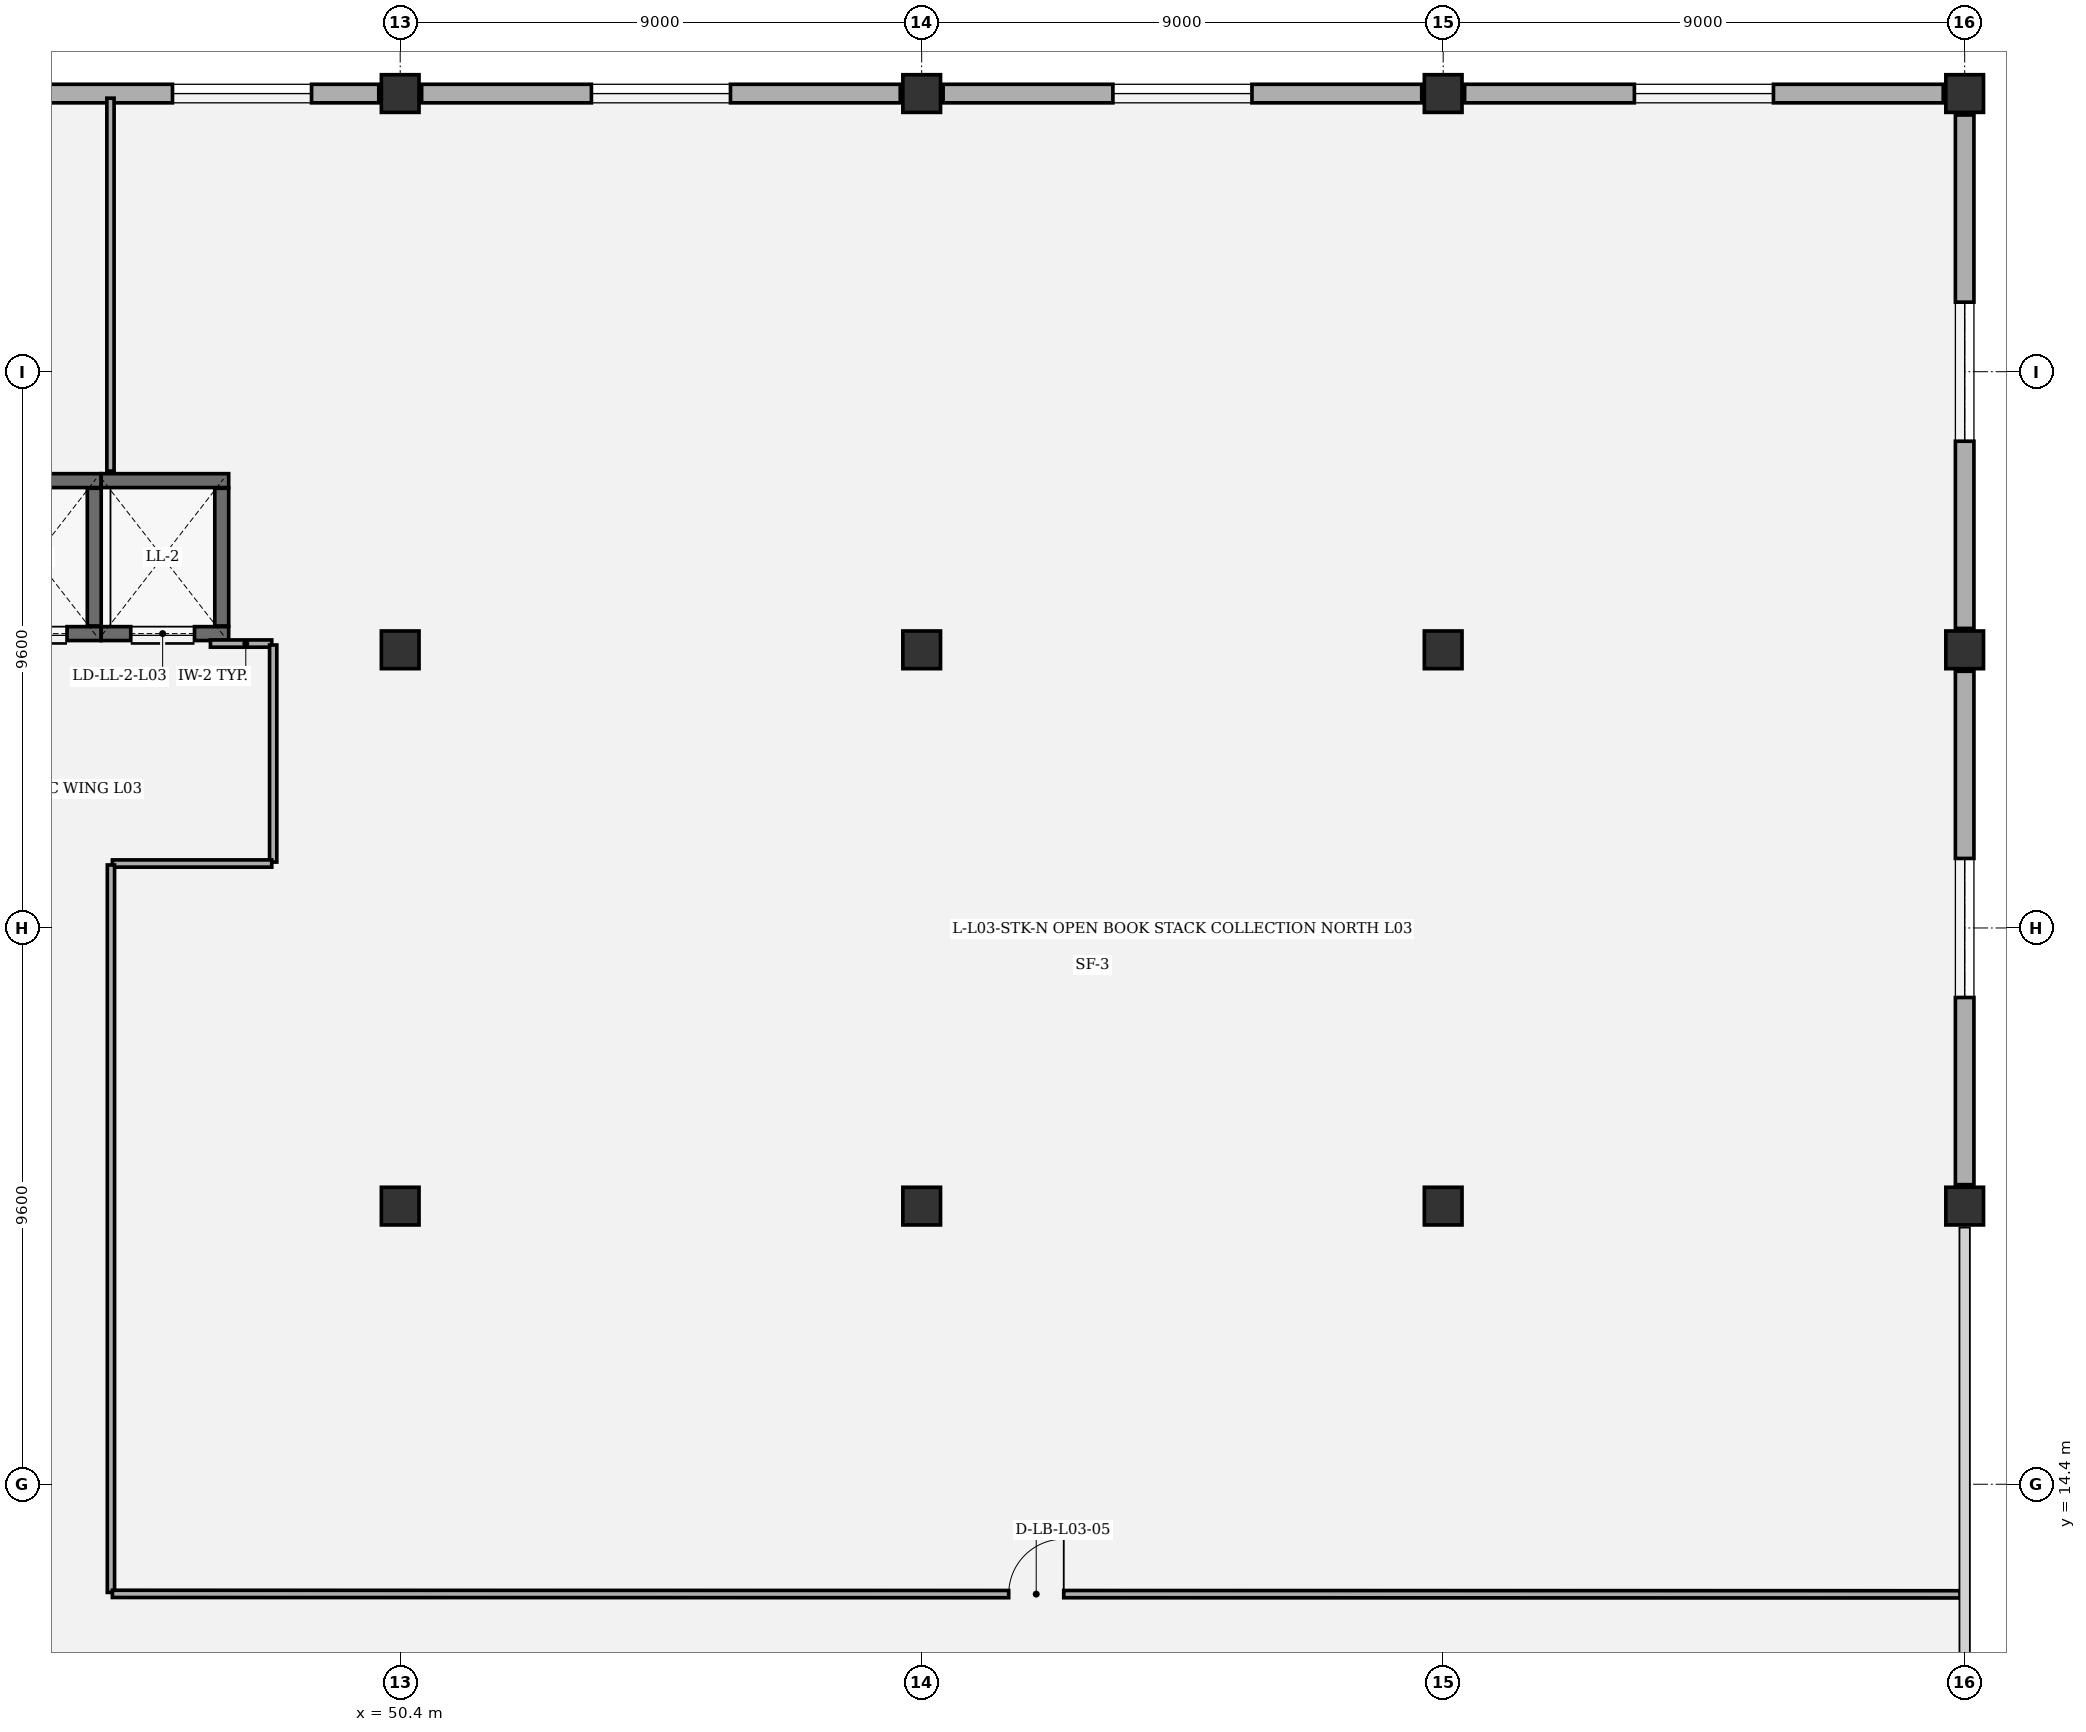
"""IFC4 building model, lengths in metres.
Left out: names, types, materials, properties, quantities, classifications, styles, units other than length and angle.
Written with IfcOpenShell. Run it as: python <this file> out.ifc"""

import sys

from ifc_helpers import new_model, si_unit, direction, frame, frame_2d, origin, origin_2d, place, context, subcontext, project, spatial, rectangle, extrude, element, fill, save


model = new_model("IFC4")
c1 = context("Model", 3, precision=1e-05, world=origin(), true_north=direction((0.0, 1.0)))
c2 = subcontext(c1, "Body", "Model", "MODEL_VIEW")
j1 = project(units=[si_unit("LENGTHUNIT", "METRE"), si_unit("PLANEANGLEUNIT", "RADIAN")], contexts=[c1])
p1 = place(None, origin())
s1 = spatial("IfcSite", under=j1, at=p1, CompositionType="ELEMENT")
p2 = place(p1, origin())
s2 = spatial("IfcBuilding", under=s1, at=p2, CompositionType="ELEMENT")
p3 = place(p2, frame((0.0, 0.0, 17.0)))
s3 = spatial("IfcBuildingStorey", under=s2, at=p3, CompositionType="ELEMENT", Elevation=17.0)
for number, where, z_axis, x_axis in (
    (1, (50.4, 19.2, 0.0), (0.0, 0.0, 1.0), (1.0, 0.0, 0.0)),
    (2, (50.4, 28.8, 0.0), (0.0, 0.0, 1.0), (1.0, 0.0, 0.0)),
    (3, (50.4, 38.4, 0.0), (0.0, 0.0, 1.0), (1.0, 0.0, 0.0)),
    (4, (59.4, 19.2, 0.0), (0.0, 0.0, 1.0), (1.0, 0.0, 0.0)),
    (5, (59.4, 28.8, 0.0), (0.0, 0.0, 1.0), (1.0, 0.0, 0.0)),
    (6, (59.4, 38.4, 0.0), (0.0, 0.0, 1.0), (1.0, 0.0, 0.0)),
    (7, (68.4, 19.2, 0.0), (0.0, 0.0, 1.0), (1.0, 0.0, 0.0)),
    (8, (68.4, 28.8, 0.0), (0.0, 0.0, 1.0), (1.0, 0.0, 0.0)),
    (9, (68.4, 38.4, 0.0), (0.0, 0.0, 1.0), (1.0, 0.0, 0.0)),
    (10, (77.4, 19.2, 0.0), (0.0, 0.0, 1.0), (1.0, 0.0, 0.0)),
    (11, (77.4, 28.8, 0.0), (0.0, 0.0, 1.0), (1.0, 0.0, 0.0)),
    (12, (77.4, 38.4, 0.0), (0.0, 0.0, 1.0), (1.0, 0.0, 0.0)),
):
    element("IfcColumn", number, at=place(p3, frame(where, z_axis=z_axis, x_axis=x_axis)), inside=s3, PredefinedType="COLUMN", context=c2, shape_type="SweptSolid", body=[
        extrude(rectangle(XDim=0.65, YDim=0.65, at=origin_2d()), origin(), (0.0, 0.0, 1.0), 5.0),
    ])
p4 = place(p3, frame((77.4, 28.43, 0.0), z_axis=(0.0, 0.0, 1.0), x_axis=(0.0, -1.0, 0.0)))
e13 = element("IfcWall", 13, at=p4, inside=s3, PredefinedType="SOLIDWALL", context=c2, shape_type="SweptSolid", body=[
    extrude(rectangle(XDim=8.86, YDim=0.32, at=frame_2d((4.43, 0.0))), origin(), (0.0, 0.0, 1.0), 3.937),
])
p5 = place(p4, frame((3.23, 0.0, 0.8)))
e14 = element("IfcOpeningElement", 14, at=p5, cuts=e13, PredefinedType="OPENING", context=c2, shape_type="SweptSolid", body=[
    extrude(rectangle(XDim=2.4, YDim=1.65, at=frame_2d((1.2, 0.825))), frame((0.0, 0.17, 0.0), z_axis=(0.0, -1.0, 0.0), x_axis=(1.0, 0.0, 0.0)), (0.0, 0.0, 1.0), 0.34),
])
p6 = place(p3, frame((77.4, 38.03, 0.0), z_axis=(0.0, 0.0, 1.0), x_axis=(0.0, -1.0, 0.0)))
e15 = element("IfcWall", 15, at=p6, inside=s3, PredefinedType="SOLIDWALL", context=c2, shape_type="SweptSolid", body=[
    extrude(rectangle(XDim=8.86, YDim=0.32, at=frame_2d((4.43, 0.0))), origin(), (0.0, 0.0, 1.0), 3.937),
])
p7 = place(p6, frame((3.23, 0.0, 0.8)))
e16 = element("IfcOpeningElement", 16, at=p7, cuts=e15, PredefinedType="OPENING", context=c2, shape_type="SweptSolid", body=[
    extrude(rectangle(XDim=2.4, YDim=1.65, at=frame_2d((1.2, 0.825))), frame((0.0, 0.17, 0.0), z_axis=(0.0, -1.0, 0.0), x_axis=(1.0, 0.0, 0.0)), (0.0, 0.0, 1.0), 0.34),
])
p8 = place(p3, frame((68.77, 38.4, 0.0), z_axis=(0.0, 0.0, 1.0), x_axis=(1.0, 0.0, 0.0)))
e17 = element("IfcWall", 17, at=p8, inside=s3, PredefinedType="SOLIDWALL", context=c2, shape_type="SweptSolid", body=[
    extrude(rectangle(XDim=8.26, YDim=0.32, at=frame_2d((4.13, 0.0))), origin(), (0.0, 0.0, 1.0), 3.937),
])
p9 = place(p8, frame((2.93, 0.0, 0.8)))
e18 = element("IfcOpeningElement", 18, at=p9, cuts=e17, PredefinedType="OPENING", context=c2, shape_type="SweptSolid", body=[
    extrude(rectangle(XDim=2.4, YDim=1.65, at=frame_2d((1.2, 0.825))), frame((0.0, 0.17, 0.0), z_axis=(0.0, -1.0, 0.0), x_axis=(1.0, 0.0, 0.0)), (0.0, 0.0, 1.0), 0.34),
])
p10 = place(p3, frame((59.77, 38.4, 0.0), z_axis=(0.0, 0.0, 1.0), x_axis=(1.0, 0.0, 0.0)))
e19 = element("IfcWall", 19, at=p10, inside=s3, PredefinedType="SOLIDWALL", context=c2, shape_type="SweptSolid", body=[
    extrude(rectangle(XDim=8.26, YDim=0.32, at=frame_2d((4.13, 0.0))), origin(), (0.0, 0.0, 1.0), 3.937),
])
p11 = place(p10, frame((2.93, 0.0, 0.8)))
e20 = element("IfcOpeningElement", 20, at=p11, cuts=e19, PredefinedType="OPENING", context=c2, shape_type="SweptSolid", body=[
    extrude(rectangle(XDim=2.4, YDim=1.65, at=frame_2d((1.2, 0.825))), frame((0.0, 0.17, 0.0), z_axis=(0.0, -1.0, 0.0), x_axis=(1.0, 0.0, 0.0)), (0.0, 0.0, 1.0), 0.34),
])
p12 = place(p3, frame((50.77, 38.4, 0.0), z_axis=(0.0, 0.0, 1.0), x_axis=(1.0, 0.0, 0.0)))
e21 = element("IfcWall", 21, at=p12, inside=s3, PredefinedType="SOLIDWALL", context=c2, shape_type="SweptSolid", body=[
    extrude(rectangle(XDim=8.26, YDim=0.32, at=frame_2d((4.13, 0.0))), origin(), (0.0, 0.0, 1.0), 3.937),
])
p13 = place(p12, frame((2.93, 0.0, 0.8)))
e22 = element("IfcOpeningElement", 22, at=p13, cuts=e21, PredefinedType="OPENING", context=c2, shape_type="SweptSolid", body=[
    extrude(rectangle(XDim=2.4, YDim=1.65, at=frame_2d((1.2, 0.825))), frame((0.0, 0.17, 0.0), z_axis=(0.0, -1.0, 0.0), x_axis=(1.0, 0.0, 0.0)), (0.0, 0.0, 1.0), 0.34),
])
p14 = place(p3, frame((41.77, 38.4, 0.0), z_axis=(0.0, 0.0, 1.0), x_axis=(1.0, 0.0, 0.0)))
e23 = element("IfcWall", 23, at=p14, inside=s3, PredefinedType="SOLIDWALL", context=c2, shape_type="SweptSolid", body=[
    extrude(rectangle(XDim=8.26, YDim=0.32, at=frame_2d((4.13, 0.0))), origin(), (0.0, 0.0, 1.0), 3.937),
])
p15 = place(p14, frame((4.7, 0.0, 0.8)))
e24 = element("IfcOpeningElement", 24, at=p15, cuts=e23, PredefinedType="OPENING", context=c2, shape_type="SweptSolid", body=[
    extrude(rectangle(XDim=2.4, YDim=1.65, at=frame_2d((1.2, 0.825))), frame((0.0, 0.17, 0.0), z_axis=(0.0, -1.0, 0.0), x_axis=(1.0, 0.0, 0.0)), (0.0, 0.0, 1.0), 0.34),
])
p16 = place(p3, frame((45.24, 29.08, 0.0), z_axis=(0.0, 0.0, 1.0), x_axis=(-1.0, 0.0, 0.0)))
e25 = element("IfcWall", 25, at=p16, inside=s3, PredefinedType="SHEAR", context=c2, shape_type="SweptSolid", body=[
    extrude(rectangle(XDim=2.28, YDim=0.24, at=frame_2d((1.14, 0.0))), origin(), (0.0, 0.0, 1.0), 4.74),
])
p17 = place(p16, frame((0.59, 0.0, 0.0)))
e26 = element("IfcOpeningElement", 26, at=p17, cuts=e25, PredefinedType="OPENING", context=c2, shape_type="SweptSolid", body=[
    extrude(rectangle(XDim=1.1, YDim=2.2, at=frame_2d((0.55, 1.1))), frame((0.0, 0.13, 0.0), z_axis=(0.0, -1.0, 0.0), x_axis=(1.0, 0.0, 0.0)), (0.0, 0.0, 1.0), 0.26),
])
p18 = place(p3, frame((42.96, 31.72, 0.0), z_axis=(0.0, 0.0, 1.0), x_axis=(1.0, 0.0, 0.0)))
e27 = element("IfcWall", 27, at=p18, inside=s3, PredefinedType="SHEAR", context=c2, shape_type="SweptSolid", body=[
    extrude(rectangle(XDim=2.28, YDim=0.24, at=frame_2d((1.14, 0.0))), origin(), (0.0, 0.0, 1.0), 4.74),
])
p19 = place(p3, frame((45.12, 31.588, 0.0), z_axis=(0.0, 0.0, 1.0), x_axis=(0.0, -1.0, 0.0)))
e28 = element("IfcWall", 28, at=p19, inside=s3, PredefinedType="SHEAR", context=c2, shape_type="SweptSolid", body=[
    extrude(rectangle(XDim=2.376, YDim=0.24, at=frame_2d((1.188, 0.0))), origin(), (0.0, 0.0, 1.0), 4.74),
])
p20 = place(p3, frame((47.44, 29.08, 0.0), z_axis=(0.0, 0.0, 1.0), x_axis=(-1.0, 0.0, 0.0)))
e29 = element("IfcWall", 29, at=p20, inside=s3, PredefinedType="SHEAR", context=c2, shape_type="SweptSolid", body=[
    extrude(rectangle(XDim=2.2, YDim=0.24, at=frame_2d((1.1, 0.0))), origin(), (0.0, 0.0, 1.0), 4.74),
])
p21 = place(p20, frame((0.59, 0.0, 0.0)))
e30 = element("IfcOpeningElement", 30, at=p21, cuts=e29, PredefinedType="OPENING", context=c2, shape_type="SweptSolid", body=[
    extrude(rectangle(XDim=1.1, YDim=2.2, at=frame_2d((0.55, 1.1))), frame((0.0, 0.13, 0.0), z_axis=(0.0, -1.0, 0.0), x_axis=(1.0, 0.0, 0.0)), (0.0, 0.0, 1.0), 0.26),
])
p22 = place(p3, frame((45.24, 31.72, 0.0), z_axis=(0.0, 0.0, 1.0), x_axis=(1.0, 0.0, 0.0)))
e31 = element("IfcWall", 31, at=p22, inside=s3, PredefinedType="SHEAR", context=c2, shape_type="SweptSolid", body=[
    extrude(rectangle(XDim=2.2, YDim=0.24, at=frame_2d((1.1, 0.0))), origin(), (0.0, 0.0, 1.0), 4.74),
])
p23 = place(p3, frame((47.32, 31.588, 0.0), z_axis=(0.0, 0.0, 1.0), x_axis=(0.0, -1.0, 0.0)))
e32 = element("IfcWall", 32, at=p23, inside=s3, PredefinedType="SHEAR", context=c2, shape_type="SweptSolid", body=[
    extrude(rectangle(XDim=2.376, YDim=0.24, at=frame_2d((1.188, 0.0))), origin(), (0.0, 0.0, 1.0), 4.74),
])
p24 = place(p3, frame((48.183, 28.908, 0.0), z_axis=(0.0, 0.0, 1.0), x_axis=(-1.0, 0.0, 0.0)))
e33 = element("IfcWall", 33, at=p24, inside=s3, PredefinedType="PARTITIONING", context=c2, shape_type="SweptSolid", body=[
    extrude(rectangle(XDim=1.058, YDim=0.125, at=frame_2d((0.529, 0.0))), origin(), (0.0, 0.0, 1.0), 4.014),
])
p25 = place(p3, frame((48.208, 28.883, 0.0), z_axis=(0.0, 0.0, 1.0), x_axis=(0.0, -1.0, 0.0)))
e34 = element("IfcWall", 34, at=p25, inside=s3, PredefinedType="PARTITIONING", context=c2, shape_type="SweptSolid", body=[
    extrude(rectangle(XDim=3.746, YDim=0.125, at=frame_2d((1.873, 0.0))), origin(), (0.0, 0.0, 1.0), 4.74),
])
p26 = place(p3, frame((45.433, 25.112, 0.0), z_axis=(0.0, 0.0, 1.0), x_axis=(1.0, 0.0, 0.0)))
e35 = element("IfcWall", 35, at=p26, inside=s3, PredefinedType="PARTITIONING", context=c2, shape_type="SweptSolid", body=[
    extrude(rectangle(XDim=2.75, YDim=0.125, at=frame_2d((1.375, 0.0))), origin(), (0.0, 0.0, 1.0), 4.74),
])
p27 = place(p3, frame((45.408, 25.087, 0.0), z_axis=(0.0, 0.0, 1.0), x_axis=(0.0, -1.0, 0.0)))
e36 = element("IfcWall", 36, at=p27, inside=s3, PredefinedType="PARTITIONING", context=c2, shape_type="SweptSolid", body=[
    extrude(rectangle(XDim=12.554, YDim=0.125, at=frame_2d((6.277, 0.0))), origin(), (0.0, 0.0, 1.0), 4.74),
])
p28 = place(p3, frame((45.433, 12.508, 0.0), z_axis=(0.0, 0.0, 1.0), x_axis=(0.999999968081, -0.000252662519, 0.0)))
e37 = element("IfcWall", 37, at=p28, inside=s3, PredefinedType="PARTITIONING", context=c2, shape_type="SweptSolid", body=[
    extrude(rectangle(XDim=31.887, YDim=0.125, at=frame_2d((15.943, 0.0))), origin(), (0.0, 0.0, 1.0), 4.74),
])
p29 = place(p28, frame((15.469, 0.0, 0.0)))
e38 = element("IfcOpeningElement", 38, at=p29, cuts=e37, PredefinedType="OPENING", context=c2, shape_type="SweptSolid", body=[
    extrude(rectangle(XDim=0.95, YDim=2.15, at=frame_2d((0.475, 1.075))), frame((0.0, 0.073, 0.0), z_axis=(0.0, -1.0, 0.0), x_axis=(1.0, 0.0, 0.0)), (0.0, 0.0, 1.0), 0.145),
])
p30 = place(p3, frame((45.4, 38.32, 0.0), z_axis=(0.0, 0.0, 1.0), x_axis=(0.0, -1.0, 0.0)))
e39 = element("IfcWall", 39, at=p30, inside=s3, PredefinedType="PARTITIONING", context=c2, shape_type="SweptSolid", body=[
    extrude(rectangle(XDim=6.435, YDim=0.125, at=frame_2d((3.218, 0.0))), origin(), (0.0, 0.0, 1.0), 4.74),
])
p31 = place(p5, origin())
e40 = element("IfcWindow", 40, at=p31, inside=s3, PartitioningType="SINGLE_PANEL", PredefinedType="WINDOW", context=c2, shape_type="SweptSolid", body=[
    extrude(rectangle(XDim=2.4, YDim=1.65, at=frame_2d((1.2, 0.825))), frame((0.0, 0.03, 0.0), z_axis=(0.0, -1.0, 0.0), x_axis=(1.0, 0.0, 0.0)), (0.0, 0.0, 1.0), 0.06),
])
fill(e14, e40)
p32 = place(p7, origin())
e41 = element("IfcWindow", 41, at=p32, inside=s3, PartitioningType="SINGLE_PANEL", PredefinedType="WINDOW", context=c2, shape_type="SweptSolid", body=[
    extrude(rectangle(XDim=2.4, YDim=1.65, at=frame_2d((1.2, 0.825))), frame((0.0, 0.03, 0.0), z_axis=(0.0, -1.0, 0.0), x_axis=(1.0, 0.0, 0.0)), (0.0, 0.0, 1.0), 0.06),
])
fill(e16, e41)
p33 = place(p9, origin())
e42 = element("IfcWindow", 42, at=p33, inside=s3, PartitioningType="SINGLE_PANEL", PredefinedType="WINDOW", context=c2, shape_type="SweptSolid", body=[
    extrude(rectangle(XDim=2.4, YDim=1.65, at=frame_2d((1.2, 0.825))), frame((0.0, 0.03, 0.0), z_axis=(0.0, -1.0, 0.0), x_axis=(1.0, 0.0, 0.0)), (0.0, 0.0, 1.0), 0.06),
])
fill(e18, e42)
p34 = place(p11, origin())
e43 = element("IfcWindow", 43, at=p34, inside=s3, PartitioningType="SINGLE_PANEL", PredefinedType="WINDOW", context=c2, shape_type="SweptSolid", body=[
    extrude(rectangle(XDim=2.4, YDim=1.65, at=frame_2d((1.2, 0.825))), frame((0.0, 0.03, 0.0), z_axis=(0.0, -1.0, 0.0), x_axis=(1.0, 0.0, 0.0)), (0.0, 0.0, 1.0), 0.06),
])
fill(e20, e43)
p35 = place(p13, origin())
e44 = element("IfcWindow", 44, at=p35, inside=s3, PartitioningType="SINGLE_PANEL", PredefinedType="WINDOW", context=c2, shape_type="SweptSolid", body=[
    extrude(rectangle(XDim=2.4, YDim=1.65, at=frame_2d((1.2, 0.825))), frame((0.0, 0.03, 0.0), z_axis=(0.0, -1.0, 0.0), x_axis=(1.0, 0.0, 0.0)), (0.0, 0.0, 1.0), 0.06),
])
fill(e22, e44)
p36 = place(p15, origin())
e45 = element("IfcWindow", 45, at=p36, inside=s3, PartitioningType="SINGLE_PANEL", PredefinedType="WINDOW", context=c2, shape_type="SweptSolid", body=[
    extrude(rectangle(XDim=2.4, YDim=1.65, at=frame_2d((1.2, 0.825))), frame((0.0, 0.03, 0.0), z_axis=(0.0, -1.0, 0.0), x_axis=(1.0, 0.0, 0.0)), (0.0, 0.0, 1.0), 0.06),
])
fill(e24, e45)
p37 = place(p17, origin())
e46 = element("IfcDoor", 46, at=p37, inside=s3, OperationType="DOUBLE_DOOR_SLIDING", PredefinedType="DOOR", context=c2, shape_type="SweptSolid", body=[
    extrude(rectangle(XDim=1.1, YDim=2.2, at=frame_2d((0.55, 1.1))), frame((0.0, 0.025, 0.0), z_axis=(0.0, -1.0, 0.0), x_axis=(1.0, 0.0, 0.0)), (0.0, 0.0, 1.0), 0.05),
])
fill(e26, e46)
p38 = place(p21, origin())
e47 = element("IfcDoor", 47, at=p38, inside=s3, OperationType="DOUBLE_DOOR_SLIDING", PredefinedType="DOOR", context=c2, shape_type="SweptSolid", body=[
    extrude(rectangle(XDim=1.1, YDim=2.2, at=frame_2d((0.55, 1.1))), frame((0.0, 0.025, 0.0), z_axis=(0.0, -1.0, 0.0), x_axis=(1.0, 0.0, 0.0)), (0.0, 0.0, 1.0), 0.05),
])
fill(e30, e47)
p39 = place(p29, origin())
e48 = element("IfcDoor", 48, at=p39, inside=s3, OperationType="SINGLE_SWING_RIGHT", PredefinedType="DOOR", context=c2, shape_type="SweptSolid", body=[
    extrude(rectangle(XDim=0.95, YDim=2.15, at=frame_2d((0.475, 1.075))), frame((0.0, 0.025, 0.0), z_axis=(0.0, -1.0, 0.0), x_axis=(1.0, 0.0, 0.0)), (0.0, 0.0, 1.0), 0.05),
])
fill(e38, e48)
save(model, sys.argv[1])
